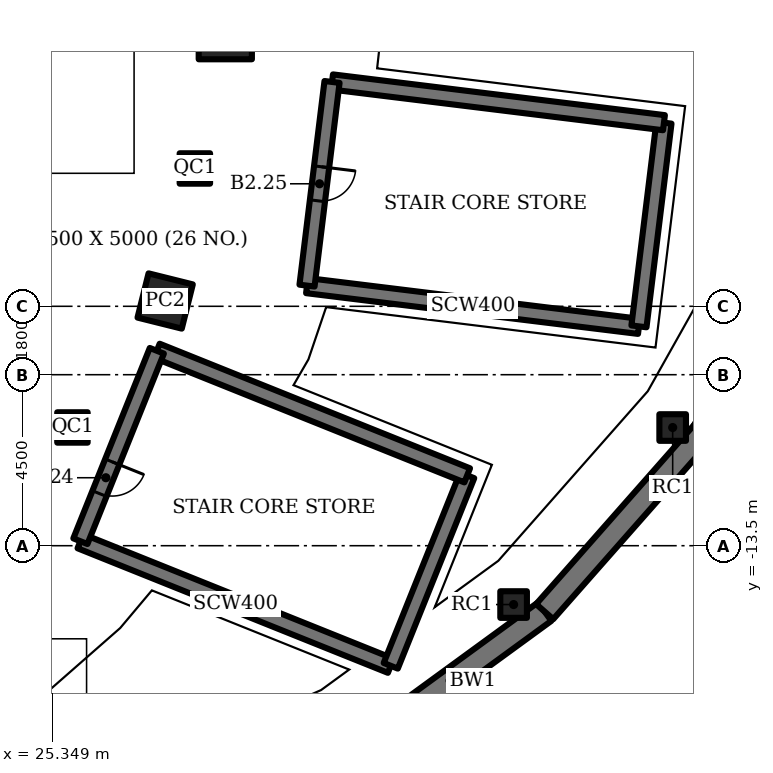
"""IFC4 building model, lengths in metres.
Left out: names, types, materials, properties, quantities, classifications, styles, units other than length and angle.
Written with IfcOpenShell. Run it as: python <this file> out.ifc"""

import sys

from ifc_helpers import new_model, si_unit, direction, frame, frame_2d, origin, origin_2d, place, context, subcontext, project, spatial, rectangle, hollow_rectangle, extrude, element, fill, save


model = new_model("IFC4")
c1 = context("Model", 3, precision=1e-05, world=origin(), true_north=direction((0.0, 1.0)))
c2 = subcontext(c1, "Body", "Model", "MODEL_VIEW")
j1 = project(units=[si_unit("LENGTHUNIT", "METRE"), si_unit("PLANEANGLEUNIT", "RADIAN")], contexts=[c1])
p1 = place(None, origin())
s1 = spatial("IfcSite", under=j1, at=p1, CompositionType="ELEMENT")
p2 = place(p1, origin())
s2 = spatial("IfcBuilding", under=s1, at=p2, CompositionType="ELEMENT")
p3 = place(p2, frame((0.0, 0.0, -10.0)))
s3 = spatial("IfcBuildingStorey", under=s2, at=p3, CompositionType="ELEMENT", Elevation=-10.0)
p4 = place(p3, frame((29.9, 0.0, 0.0), z_axis=(0.0, 0.0, 1.0), x_axis=(1.0, 0.0, 0.0)))
e1 = element("IfcColumn", 1, at=p4, inside=s3, PredefinedType="COLUMN", context=c2, shape_type="SweptSolid", body=[
    extrude(hollow_rectangle(XDim=1.4, YDim=1.4, WallThickness=0.1, at=origin_2d()), origin(), (0.0, 0.0, 1.0), 4.5),
])
p5 = place(p3, frame((28.318, -7.06, 0.0), z_axis=(0.0, 0.0, 1.0), x_axis=(0.2419218956, 0.970295726276, 0.0)))
e2 = element("IfcColumn", 2, at=p5, inside=s3, PredefinedType="COLUMN", context=c2, shape_type="SweptSolid", body=[
    extrude(hollow_rectangle(XDim=1.2, YDim=1.2, WallThickness=0.1, at=origin_2d()), origin(), (0.0, 0.0, 1.0), 4.5),
])
for number, where, z_axis, x_axis in (
    (3, (25.878, -10.388, 0.0), (0.0, 0.0, 1.0), (1.0, 0.0, 0.0)),
    (4, (29.099, -3.573, 0.0), (0.0, 0.0, 1.0), (1.0, 0.0, 0.0)),
):
    element("IfcColumn", number, at=place(p3, frame(where, z_axis=z_axis, x_axis=x_axis)), inside=s3, PredefinedType="COLUMN", context=c2, shape_type="SweptSolid", body=[
        extrude(hollow_rectangle(XDim=0.8, YDim=0.8, WallThickness=0.05, at=origin_2d()), origin(), (0.0, 0.0, 1.0), 4.5),
    ])
for number, where, z_axis, x_axis in (
    (5, (37.487, -15.049, 0.0), (0.0, 0.0, 1.0), (1.0, 0.0, 0.0)),
    (6, (41.672, -10.39, 0.0), (0.0, 0.0, 1.0), (1.0, 0.0, 0.0)),
):
    element("IfcColumn", number, at=place(p3, frame(where, z_axis=z_axis, x_axis=x_axis)), inside=s3, PredefinedType="COLUMN", context=c2, shape_type="SweptSolid", body=[
        extrude(hollow_rectangle(XDim=0.7, YDim=0.7, WallThickness=0.04, at=origin_2d()), origin(), (0.0, 0.0, 1.0), 4.5),
    ])
p6 = place(p3, frame((33.325, -18.867, 0.0), z_axis=(0.0, 0.0, 1.0), x_axis=(0.807914805436, 0.589299301847, 0.0)))
e7 = element("IfcWall", 7, at=p6, inside=s3, PredefinedType="SOLIDWALL", context=c2, shape_type="SweptSolid", body=[
    extrude(rectangle(XDim=6.163, YDim=0.6, at=frame_2d((3.082, 0.0))), origin(), (0.0, 0.0, 1.0), 4.5),
])
p7 = place(p3, frame((38.304, -15.235, 0.0), z_axis=(0.0, 0.0, 1.0), x_axis=(0.661181871868, 0.750225654262, 0.0)))
e8 = element("IfcWall", 8, at=p7, inside=s3, PredefinedType="SOLIDWALL", context=c2, shape_type="SweptSolid", body=[
    extrude(rectangle(XDim=6.336, YDim=0.6, at=frame_2d((3.168, 0.0))), origin(), (0.0, 0.0, 1.0), 4.5),
])
p8 = place(p3, frame((26.087, -13.382, 0.0), z_axis=(0.0, 0.0, 1.0), x_axis=(0.92801678004, -0.372538395288, 0.0)))
e9 = element("IfcWall", 9, at=p8, inside=s3, PredefinedType="SHEAR", context=c2, shape_type="SweptSolid", body=[
    extrude(rectangle(XDim=8.8, YDim=0.4, at=frame_2d((4.4, 0.0))), origin(), (0.0, 0.0, 1.0), 4.5),
])
p9 = place(p3, frame((34.253, -16.66, 0.0), z_axis=(0.0, 0.0, 1.0), x_axis=(0.372544066459, 0.928014503414, 0.0)))
e10 = element("IfcWall", 10, at=p9, inside=s3, PredefinedType="SHEAR", context=c2, shape_type="SweptSolid", body=[
    extrude(rectangle(XDim=5.4, YDim=0.4, at=frame_2d((2.7, 0.0))), origin(), (0.0, 0.0, 1.0), 4.5),
])
p10 = place(p3, frame((36.265, -11.649, 0.0), z_axis=(0.0, 0.0, 1.0), x_axis=(-0.928007188331, 0.372562287955, 0.0)))
e11 = element("IfcWall", 11, at=p10, inside=s3, PredefinedType="SHEAR", context=c2, shape_type="SweptSolid", body=[
    extrude(rectangle(XDim=8.8, YDim=0.4, at=frame_2d((4.4, 0.0))), origin(), (0.0, 0.0, 1.0), 4.5),
])
p11 = place(p3, frame((28.099, -8.37, 0.0), z_axis=(0.0, 0.0, 1.0), x_axis=(-0.372528436202, -0.928020777904, 0.0)))
e12 = element("IfcWall", 12, at=p11, inside=s3, PredefinedType="SHEAR", context=c2, shape_type="SweptSolid", body=[
    extrude(rectangle(XDim=5.4, YDim=0.4, at=frame_2d((2.7, 0.0))), origin(), (0.0, 0.0, 1.0), 4.5),
])
p12 = place(p11, frame((3.15, 0.0, 0.0)))
e13 = element("IfcOpeningElement", 13, at=p12, cuts=e12, PredefinedType="OPENING", context=c2, shape_type="SweptSolid", body=[
    extrude(rectangle(XDim=0.9, YDim=2.1, at=frame_2d((0.45, 1.05))), frame((0.0, 0.21, 0.0), z_axis=(0.0, -1.0, 0.0), x_axis=(1.0, 0.0, 0.0)), (0.0, 0.0, 1.0), 0.42),
])
p13 = place(p3, frame((32.051, -6.656, 0.0), z_axis=(0.0, 0.0, 1.0), x_axis=(0.992545280606, -0.121876437212, 0.0)))
e14 = element("IfcWall", 14, at=p13, inside=s3, PredefinedType="SHEAR", context=c2, shape_type="SweptSolid", body=[
    extrude(rectangle(XDim=8.8, YDim=0.4, at=frame_2d((4.4, 0.0))), origin(), (0.0, 0.0, 1.0), 4.5),
])
p14 = place(p3, frame((40.785, -7.728, 0.0), z_axis=(0.0, 0.0, 1.0), x_axis=(0.121892082937, 0.992543359314, 0.0)))
e15 = element("IfcWall", 15, at=p14, inside=s3, PredefinedType="SHEAR", context=c2, shape_type="SweptSolid", body=[
    extrude(rectangle(XDim=5.4, YDim=0.4, at=frame_2d((2.7, 0.0))), origin(), (0.0, 0.0, 1.0), 4.5),
])
p15 = place(p3, frame((41.443, -2.368, 0.0), z_axis=(0.0, 0.0, 1.0), x_axis=(-0.992545692684, 0.121873081252, 0.0)))
e16 = element("IfcWall", 16, at=p15, inside=s3, PredefinedType="SHEAR", context=c2, shape_type="SweptSolid", body=[
    extrude(rectangle(XDim=8.8, YDim=0.4, at=frame_2d((4.4, 0.0))), origin(), (0.0, 0.0, 1.0), 4.5),
])
p16 = place(p3, frame((32.708, -1.296, 0.0), z_axis=(0.0, 0.0, 1.0), x_axis=(-0.12184754212, -0.99254882826, 0.0)))
e17 = element("IfcWall", 17, at=p16, inside=s3, PredefinedType="SHEAR", context=c2, shape_type="SweptSolid", body=[
    extrude(rectangle(XDim=5.4, YDim=0.4, at=frame_2d((2.7, 0.0))), origin(), (0.0, 0.0, 1.0), 4.5),
])
p17 = place(p16, frame((2.25, 0.0, 0.0)))
e18 = element("IfcOpeningElement", 18, at=p17, cuts=e17, PredefinedType="OPENING", context=c2, shape_type="SweptSolid", body=[
    extrude(rectangle(XDim=0.9, YDim=2.1, at=frame_2d((0.45, 1.05))), frame((0.0, 0.21, 0.0), z_axis=(0.0, -1.0, 0.0), x_axis=(1.0, 0.0, 0.0)), (0.0, 0.0, 1.0), 0.42),
])
p18 = place(p12, origin())
e19 = element("IfcDoor", 19, at=p18, inside=s3, OperationType="SINGLE_SWING_LEFT", PredefinedType="DOOR", context=c2, shape_type="SweptSolid", body=[
    extrude(rectangle(XDim=0.9, YDim=2.1, at=frame_2d((0.45, 1.05))), frame((0.0, 0.025, 0.0), z_axis=(0.0, -1.0, 0.0), x_axis=(1.0, 0.0, 0.0)), (0.0, 0.0, 1.0), 0.05),
])
fill(e13, e19)
p19 = place(p17, origin())
e20 = element("IfcDoor", 20, at=p19, inside=s3, OperationType="SINGLE_SWING_LEFT", PredefinedType="DOOR", context=c2, shape_type="SweptSolid", body=[
    extrude(rectangle(XDim=0.9, YDim=2.1, at=frame_2d((0.45, 1.05))), frame((0.0, 0.025, 0.0), z_axis=(0.0, -1.0, 0.0), x_axis=(1.0, 0.0, 0.0)), (0.0, 0.0, 1.0), 0.05),
])
fill(e18, e20)
save(model, sys.argv[1])
